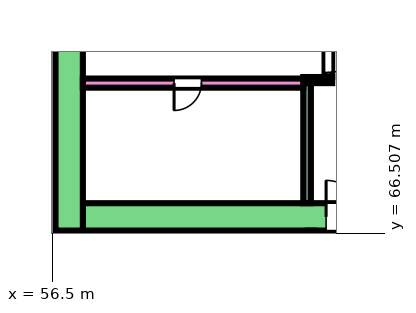
"""IFC4 building model, lengths in metres.
Left out: names, types, materials, properties, quantities, classifications, styles, units other than length and angle.
Written with IfcOpenShell. Run it as: python <this file> out.ifc"""

import sys

from ifc_helpers import new_model, si_unit, direction, frame, frame_2d, origin, place, context, subcontext, project, spatial, rectangle, extrude, element, fill, save


model = new_model("IFC4")
c1 = context("Model", 3, precision=1e-05, world=origin(), true_north=direction((0.0, 1.0)))
c2 = subcontext(c1, "Body", "Model", "MODEL_VIEW")
j1 = project(units=[si_unit("LENGTHUNIT", "METRE"), si_unit("PLANEANGLEUNIT", "RADIAN")], contexts=[c1])
p1 = place(None, origin())
s1 = spatial("IfcSite", under=j1, at=p1, CompositionType="ELEMENT")
p2 = place(p1, origin())
s2 = spatial("IfcBuilding", under=s1, at=p2, CompositionType="ELEMENT")
p3 = place(p2, origin())
s3 = spatial("IfcBuildingStorey", under=s2, at=p3, CompositionType="ELEMENT", Elevation=0.0)
p4 = place(p3, frame((72.1, 67.05, 0.0), z_axis=(0.0, 0.0, 1.0), x_axis=(-1.0, 0.0, 0.0)))
e1 = element("IfcWall", 1, at=p4, inside=s3, PredefinedType="SHEAR", context=c2, shape_type="SweptSolid", body=[
    extrude(rectangle(XDim=14.6, YDim=0.9, at=frame_2d((7.3, 0.0))), origin(), (0.0, 0.0, 1.0), 6.55),
])
p5 = place(p4, frame((4.2, 0.0, 0.0)))
e2 = element("IfcOpeningElement", 2, at=p5, cuts=e1, PredefinedType="OPENING", context=c2, shape_type="SweptSolid", body=[
    extrude(rectangle(XDim=2.4, YDim=2.4, at=frame_2d((1.2, 1.2))), frame((0.0, 0.46, 0.0), z_axis=(0.0, -1.0, 0.0), x_axis=(1.0, 0.0, 0.0)), (0.0, 0.0, 1.0), 0.92),
])
p6 = place(p3, frame((57.05, 83.4, 0.0), z_axis=(0.0, 0.0, 1.0), x_axis=(0.0, -1.0, 0.0)))
e3 = element("IfcWall", 3, at=p6, inside=s3, PredefinedType="SHEAR", context=c2, shape_type="SweptSolid", body=[
    extrude(rectangle(XDim=16.8, YDim=0.9, at=frame_2d((8.4, 0.0))), origin(), (0.0, 0.0, 1.0), 6.55),
])
p7 = place(p3, frame((64.875, 71.45, 0.0), z_axis=(0.0, 0.0, 1.0), x_axis=(0.0, -1.0, 0.0)))
e4 = element("IfcWall", 4, at=p7, inside=s3, PredefinedType="SHEAR", context=c2, shape_type="SweptSolid", body=[
    extrude(rectangle(XDim=3.95, YDim=0.25, at=frame_2d((1.975, 0.0))), origin(), (0.0, 0.0, 1.0), 6.55),
])
p8 = place(p3, frame((65.7, 71.55, 0.0), z_axis=(0.0, 0.0, 1.0), x_axis=(-1.0, 0.0, 0.0)))
e5 = element("IfcWall", 5, at=p8, inside=s3, PredefinedType="SHEAR", context=c2, shape_type="SweptSolid", body=[
    extrude(rectangle(XDim=0.95, YDim=0.2, at=frame_2d((0.475, 0.0))), origin(), (0.0, 0.0, 1.0), 6.55),
])
p9 = place(p3, frame((65.575, 73.15, 0.0), z_axis=(0.0, 0.0, 1.0), x_axis=(0.0, -1.0, 0.0)))
e6 = element("IfcWall", 6, at=p9, inside=s3, PredefinedType="SHEAR", context=c2, shape_type="SweptSolid", body=[
    extrude(rectangle(XDim=1.5, YDim=0.25, at=frame_2d((0.75, 0.0))), origin(), (0.0, 0.0, 1.0), 6.55),
])
p10 = place(p9, frame((0.15, 0.0, 0.0)))
e7 = element("IfcOpeningElement", 7, at=p10, cuts=e6, PredefinedType="OPENING", context=c2, shape_type="SweptSolid", body=[
    extrude(rectangle(XDim=1.2, YDim=2.1, at=frame_2d((0.6, 1.05))), frame((0.0, 0.135, 0.0), z_axis=(0.0, -1.0, 0.0), x_axis=(1.0, 0.0, 0.0)), (0.0, 0.0, 1.0), 0.27),
])
p11 = place(p3, frame((64.75, 71.45, 0.0), z_axis=(0.0, 0.0, 1.0), x_axis=(-1.0, 0.0, 0.0)))
e8 = element("IfcWall", 8, at=p11, inside=s3, PredefinedType="SHEAR", context=c2, shape_type="SweptSolid", body=[
    extrude(rectangle(XDim=7.25, YDim=0.3, at=frame_2d((3.625, 0.0))), origin(), (0.0, 0.0, 1.0), 6.55),
])
p12 = place(p11, frame((3.35, 0.0, 0.0)))
e9 = element("IfcOpeningElement", 9, at=p12, cuts=e8, PredefinedType="OPENING", context=c2, shape_type="SweptSolid", body=[
    extrude(rectangle(XDim=0.9, YDim=2.1, at=frame_2d((0.45, 1.05))), frame((0.0, 0.16, 0.0), z_axis=(0.0, -1.0, 0.0), x_axis=(1.0, 0.0, 0.0)), (0.0, 0.0, 1.0), 0.32),
])
p13 = place(p3, frame((65.0, 65.2, 0.0), z_axis=(0.0, 0.0, 1.0), x_axis=(0.0, 1.0, 0.0)))
e10 = element("IfcWall", 10, at=p13, inside=s3, PredefinedType="PARTITIONING", context=c2, shape_type="SweptSolid", body=[
    extrude(rectangle(XDim=1.399, YDim=0.2, at=frame_2d((0.7, 0.0))), origin(), (0.0, 0.0, 1.0), 6.55),
])
p14 = place(p10, origin())
e11 = element("IfcDoor", 11, at=p14, inside=s3, OperationType="SINGLE_SWING_LEFT", PredefinedType="DOOR", context=c2, shape_type="SweptSolid", body=[
    extrude(rectangle(XDim=1.2, YDim=2.1, at=frame_2d((0.6, 1.05))), frame((0.0, 0.025, 0.0), z_axis=(0.0, -1.0, 0.0), x_axis=(1.0, 0.0, 0.0)), (0.0, 0.0, 1.0), 0.05),
])
fill(e7, e11)
p15 = place(p12, origin())
e12 = element("IfcDoor", 12, at=p15, inside=s3, OperationType="SINGLE_SWING_RIGHT", PredefinedType="DOOR", context=c2, shape_type="SweptSolid", body=[
    extrude(rectangle(XDim=0.9, YDim=2.1, at=frame_2d((0.45, 1.05))), frame((0.0, 0.025, 0.0), z_axis=(0.0, -1.0, 0.0), x_axis=(1.0, 0.0, 0.0)), (0.0, 0.0, 1.0), 0.05),
])
fill(e9, e12)
p16 = place(p5, frame((2.4, 0.0, 0.0), z_axis=(0.0, 0.0, 1.0), x_axis=(-1.0, 0.0, 0.0)))
e13 = element("IfcDoor", 13, at=p16, inside=s3, OperationType="DOUBLE_DOOR_SINGLE_SWING", PredefinedType="DOOR", context=c2, shape_type="SweptSolid", body=[
    extrude(rectangle(XDim=2.4, YDim=2.4, at=frame_2d((1.2, 1.2))), frame((0.0, 0.025, 0.0), z_axis=(0.0, -1.0, 0.0), x_axis=(1.0, 0.0, 0.0)), (0.0, 0.0, 1.0), 0.05),
])
fill(e2, e13)
save(model, sys.argv[1])
